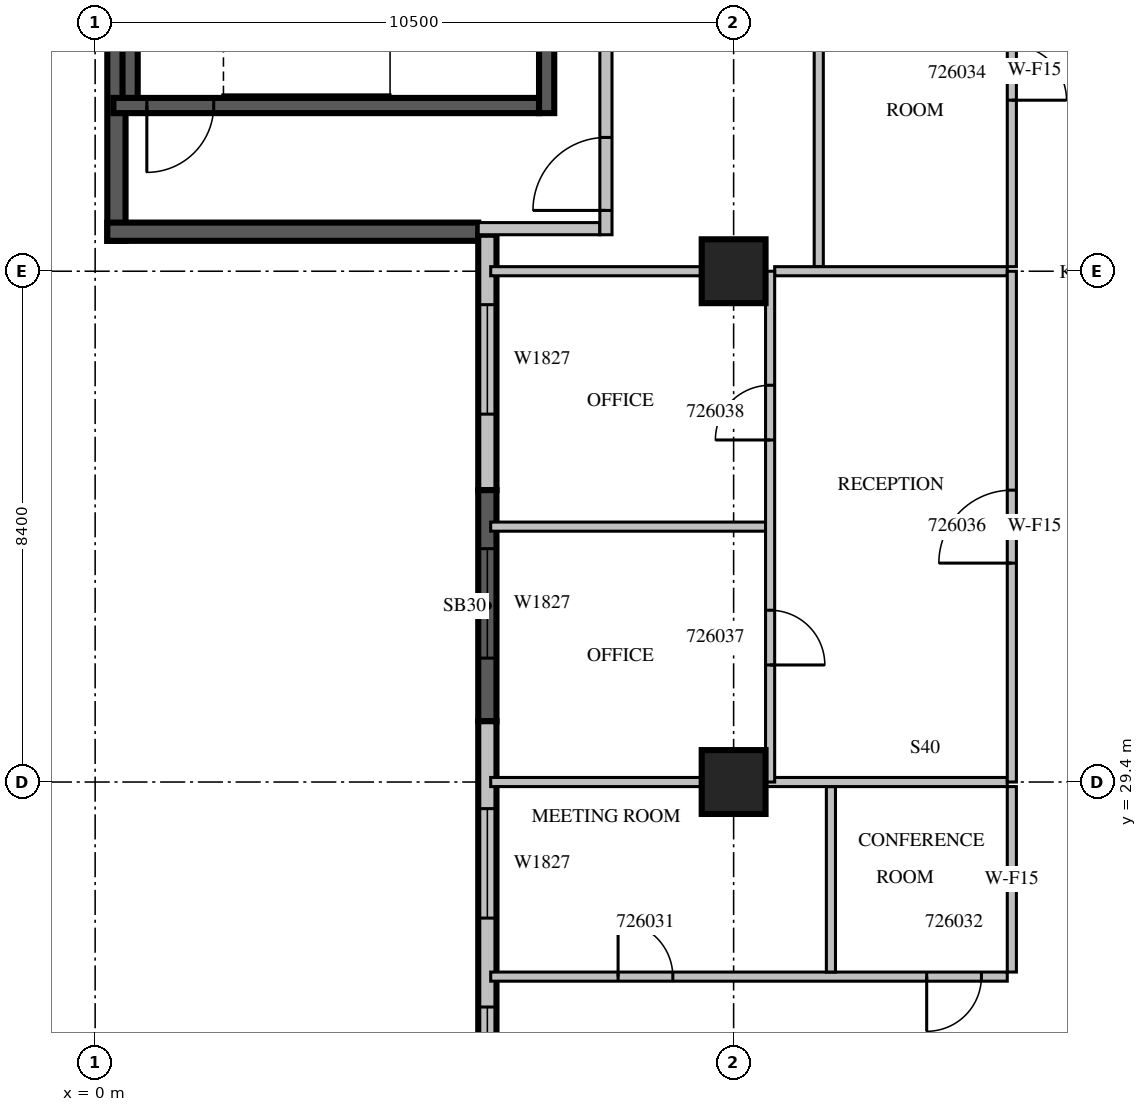
"""IFC4 building model, lengths in metres.
Left out: names, types, materials, properties, quantities, classifications, styles, units other than length and angle.
Written with IfcOpenShell. Run it as: python <this file> out.ifc"""

import sys

from ifc_helpers import new_model, si_unit, direction, frame, frame_2d, origin, origin_2d, place, context, subcontext, project, spatial, rectangle, extrude, source, transform, mapped, element, fill, save


model = new_model("IFC4")
c1 = context("Model", 3, precision=1e-05, world=origin(), true_north=direction((0.0, 1.0)))
c2 = subcontext(c1, "Body", "Model", "MODEL_VIEW")
j1 = project(units=[si_unit("LENGTHUNIT", "METRE"), si_unit("PLANEANGLEUNIT", "RADIAN")], contexts=[c1])
p1 = place(None, origin())
s1 = spatial("IfcSite", under=j1, at=p1, CompositionType="ELEMENT")
p2 = place(p1, origin())
s2 = spatial("IfcBuilding", under=s1, at=p2, CompositionType="ELEMENT")
p3 = place(p2, frame((0.0, 0.0, 120.3)))
s3 = spatial("IfcBuildingStorey", under=s2, at=p3, CompositionType="ELEMENT", Elevation=120.3)
m1 = source(origin(), c2, "Body", "SweptSolid", [
    extrude(rectangle(XDim=1.05, YDim=1.05, at=origin_2d()), origin(), (0.0, 0.0, 1.0), 4.2),
])
for number, where, z_axis, x_axis in (
    (1, (10.5, 29.4, 0.0), (0.0, 0.0, 1.0), (1.0, 0.0, 0.0)),
    (2, (10.5, 37.8, 0.0), (0.0, 0.0, 1.0), (1.0, 0.0, 0.0)),
):
    element("IfcColumn", number, at=place(p3, frame(where, z_axis=z_axis, x_axis=x_axis)), inside=s3, PredefinedType="COLUMN", context=c2, shape_type="MappedRepresentation", body=[
        mapped(m1, transform((0.0, 0.0, 0.0), scale=1.0)),
    ])
m2 = source(origin(), c2, "Body", "SweptSolid", [
    extrude(rectangle(XDim=5.65, YDim=0.3, at=frame_2d((2.825, 0.0))), origin(), (0.0, 0.0, 1.0), 3.8),
])
p4 = place(p3, frame((0.35, 43.95, 0.0), z_axis=(0.0, 0.0, 1.0), x_axis=(0.0, -1.0, 0.0)))
e3 = element("IfcWall", 3, at=p4, inside=s3, PredefinedType="SOLIDWALL", context=c2, shape_type="MappedRepresentation", body=[
    mapped(m2, transform((0.0, 0.0, 0.0), scale=1.0)),
])
m3 = source(origin(), c2, "Body", "SweptSolid", [
    extrude(rectangle(XDim=6.1, YDim=0.3, at=frame_2d((3.05, 0.0))), origin(), (0.0, 0.0, 1.0), 3.8),
])
p5 = place(p3, frame((0.2, 38.45, 0.0), z_axis=(0.0, 0.0, 1.0), x_axis=(1.0, 0.0, 0.0)))
e4 = element("IfcWall", 4, at=p5, inside=s3, PredefinedType="SOLIDWALL", context=c2, shape_type="MappedRepresentation", body=[
    mapped(m3, transform((0.0, 0.0, 0.0), scale=1.0)),
])
m4 = source(origin(), c2, "Body", "SweptSolid", [
    extrude(rectangle(XDim=4.2, YDim=0.3, at=frame_2d((2.1, 0.0))), origin(), (0.0, 0.0, 1.0), 3.8),
])
p6 = place(p3, frame((6.45, 38.4, 0.0), z_axis=(0.0, 0.0, 1.0), x_axis=(0.0, -1.0, 0.0)))
e5 = element("IfcWall", 5, at=p6, inside=s3, PredefinedType="STANDARD", context=c2, shape_type="MappedRepresentation", body=[
    mapped(m4, transform((0.0, 0.0, 0.0), scale=1.0)),
])
m5 = source(origin(), c2, "Body", "SweptSolid", [
    extrude(rectangle(XDim=1.8, YDim=2.7, at=frame_2d((0.9, 1.35))), frame((0.0, 0.16, 0.0), z_axis=(0.0, -1.0, 0.0), x_axis=(1.0, 0.0, 0.0)), (0.0, 0.0, 1.0), 0.32),
])
p7 = place(p6, frame((1.15, 0.0, 0.6)))
e6 = element("IfcOpeningElement", 6, at=p7, cuts=e5, PredefinedType="OPENING", context=c2, shape_type="MappedRepresentation", body=[
    mapped(m5, transform((0.0, 0.0, 0.0), scale=1.0)),
])
m6 = source(origin(), c2, "Body", "SweptSolid", [
    extrude(rectangle(XDim=3.8, YDim=0.3, at=frame_2d((1.9, 0.0))), origin(), (0.0, 0.0, 1.0), 3.8),
])
p8 = place(p3, frame((6.45, 34.2, 0.0), z_axis=(0.0, 0.0, 1.0), x_axis=(0.0, -1.0, 0.0)))
e7 = element("IfcWall", 7, at=p8, inside=s3, PredefinedType="SOLIDWALL", context=c2, shape_type="MappedRepresentation", body=[
    mapped(m6, transform((0.0, 0.0, 0.0), scale=1.0)),
])
p9 = place(p8, frame((0.963, 0.0, 0.6)))
e8 = element("IfcOpeningElement", 8, at=p9, cuts=e7, PredefinedType="OPENING", context=c2, shape_type="MappedRepresentation", body=[
    mapped(m5, transform((0.0, 0.0, 0.0), scale=1.0)),
])
m7 = source(origin(), c2, "Body", "SweptSolid", [
    extrude(rectangle(XDim=8.4, YDim=0.3, at=frame_2d((4.2, 0.0))), origin(), (0.0, 0.0, 1.0), 3.8),
])
p10 = place(p3, frame((6.45, 30.4, 0.0), z_axis=(0.0, 0.0, 1.0), x_axis=(0.0, -1.0, 0.0)))
e9 = element("IfcWall", 9, at=p10, inside=s3, PredefinedType="STANDARD", context=c2, shape_type="MappedRepresentation", body=[
    mapped(m7, transform((0.0, 0.0, 0.0), scale=1.0)),
])
p11 = place(p10, frame((1.438, 0.0, 0.6)))
e10 = element("IfcOpeningElement", 10, at=p11, cuts=e9, PredefinedType="OPENING", context=c2, shape_type="MappedRepresentation", body=[
    mapped(m5, transform((0.0, 0.0, 0.0), scale=1.0)),
])
m8 = source(origin(), c2, "Body", "SweptSolid", [
    extrude(rectangle(XDim=3.0, YDim=2.7, at=frame_2d((1.5, 1.35))), frame((0.0, 0.16, 0.0), z_axis=(0.0, -1.0, 0.0), x_axis=(1.0, 0.0, 0.0)), (0.0, 0.0, 1.0), 0.32),
])
p12 = place(p10, frame((4.7, 0.0, 0.6)))
e11 = element("IfcOpeningElement", 11, at=p12, cuts=e9, PredefinedType="OPENING", context=c2, shape_type="MappedRepresentation", body=[
    mapped(m8, transform((0.0, 0.0, 0.0), scale=1.0)),
])
m9 = source(origin(), c2, "Body", "SweptSolid", [
    extrude(rectangle(XDim=7.0, YDim=0.25, at=frame_2d((3.5, 0.0))), origin(), (0.0, 0.0, 1.0), 3.8),
])
p13 = place(p3, frame((0.3, 40.525, 0.0), z_axis=(0.0, 0.0, 1.0), x_axis=(1.0, 0.0, 0.0)))
e12 = element("IfcWall", 12, at=p13, inside=s3, PredefinedType="SOLIDWALL", context=c2, shape_type="MappedRepresentation", body=[
    mapped(m9, transform((0.0, 0.0, 0.0), scale=1.0)),
])
m10 = source(origin(), c2, "Body", "SweptSolid", [
    extrude(rectangle(XDim=1.1, YDim=2.1, at=frame_2d((0.55, 1.05))), frame((0.0, 0.135, 0.0), z_axis=(0.0, -1.0, 0.0), x_axis=(1.0, 0.0, 0.0)), (0.0, 0.0, 1.0), 0.27),
])
p14 = place(p13, frame((0.55, 0.0, 0.0)))
e13 = element("IfcOpeningElement", 13, at=p14, cuts=e12, PredefinedType="OPENING", context=c2, shape_type="MappedRepresentation", body=[
    mapped(m10, transform((0.0, 0.0, 0.0), scale=1.0)),
])
m11 = source(origin(), c2, "Body", "SweptSolid", [
    extrude(rectangle(XDim=3.45, YDim=0.25, at=frame_2d((1.725, 0.0))), origin(), (0.0, 0.0, 1.0), 3.8),
])
p15 = place(p3, frame((7.425, 40.4, 0.0), z_axis=(0.0, 0.0, 1.0), x_axis=(0.0, 1.0, 0.0)))
e14 = element("IfcWall", 14, at=p15, inside=s3, PredefinedType="SOLIDWALL", context=c2, shape_type="MappedRepresentation", body=[
    mapped(m11, transform((0.0, 0.0, 0.0), scale=1.0)),
])
m12 = source(origin(), c2, "Body", "SweptSolid", [
    extrude(rectangle(XDim=2.95, YDim=0.25, at=frame_2d((1.475, 0.0))), origin(), (0.0, 0.0, 1.0), 3.8),
])
p16 = place(p3, frame((0.575, 40.65, 0.0), z_axis=(0.0, 0.0, 1.0), x_axis=(0.0, 1.0, 0.0)))
e15 = element("IfcWall", 15, at=p16, inside=s3, PredefinedType="SOLIDWALL", context=c2, shape_type="MappedRepresentation", body=[
    mapped(m12, transform((0.0, 0.0, 0.0), scale=1.0)),
])
m13 = source(origin(), c2, "Body", "SweptSolid", [
    extrude(rectangle(XDim=2.0, YDim=0.2, at=frame_2d((1.0, 0.0))), origin(), (0.0, 0.0, 1.0), 3.8),
])
p17 = place(p3, frame((6.3, 38.5, 0.0), z_axis=(0.0, 0.0, 1.0), x_axis=(1.0, 0.0, 0.0)))
e16 = element("IfcWall", 16, at=p17, inside=s3, PredefinedType="PARTITIONING", context=c2, shape_type="MappedRepresentation", body=[
    mapped(m13, transform((0.0, 0.0, 0.0), scale=1.0)),
])
m14 = source(origin(), c2, "Body", "SweptSolid", [
    extrude(rectangle(XDim=5.45, YDim=0.2, at=frame_2d((2.725, 0.0))), origin(), (0.0, 0.0, 1.0), 3.8),
])
p18 = place(p3, frame((8.4, 38.4, 0.0), z_axis=(0.0, 0.0, 1.0), x_axis=(0.0, 1.0, 0.0)))
e17 = element("IfcWall", 17, at=p18, inside=s3, PredefinedType="PARTITIONING", context=c2, shape_type="MappedRepresentation", body=[
    mapped(m14, transform((0.0, 0.0, 0.0), scale=1.0)),
])
m15 = source(origin(), c2, "Body", "SweptSolid", [
    extrude(rectangle(XDim=1.2, YDim=2.1, at=frame_2d((0.6, 1.05))), frame((0.0, 0.11, 0.0), z_axis=(0.0, -1.0, 0.0), x_axis=(1.0, 0.0, 0.0)), (0.0, 0.0, 1.0), 0.22),
])
p19 = place(p18, frame((0.4, 0.0, 0.0)))
e18 = element("IfcOpeningElement", 18, at=p19, cuts=e17, PredefinedType="OPENING", context=c2, shape_type="MappedRepresentation", body=[
    mapped(m15, transform((0.0, 0.0, 0.0), scale=1.0)),
])
m16 = source(origin(), c2, "Body", "SweptSolid", [
    extrude(rectangle(XDim=0.9, YDim=2.1, at=frame_2d((0.45, 1.05))), frame((0.0, 0.11, 0.0), z_axis=(0.0, -1.0, 0.0), x_axis=(1.0, 0.0, 0.0)), (0.0, 0.0, 1.0), 0.22),
])
p20 = place(p18, frame((3.25, 0.0, 0.0)))
e19 = element("IfcOpeningElement", 19, at=p20, cuts=e17, PredefinedType="OPENING", context=c2, shape_type="MappedRepresentation", body=[
    mapped(m16, transform((0.0, 0.0, 0.0), scale=1.0)),
])
m17 = source(origin(), c2, "Body", "SweptSolid", [
    extrude(rectangle(XDim=8.495, YDim=0.15, at=frame_2d((4.247, 0.0))), origin(), (0.0, 0.0, 1.0), 3.8),
])
p21 = place(p3, frame((6.505, 26.2, 0.0), z_axis=(0.0, 0.0, 1.0), x_axis=(1.0, 0.0, 0.0)))
e20 = element("IfcWall", 20, at=p21, inside=s3, PredefinedType="PARTITIONING", context=c2, shape_type="MappedRepresentation", body=[
    mapped(m17, transform((0.0, 0.0, 0.0), scale=1.0)),
])
m18 = source(origin(), c2, "Body", "SweptSolid", [
    extrude(rectangle(XDim=0.9, YDim=2.1, at=frame_2d((0.45, 1.05))), frame((0.0, 0.085, 0.0), z_axis=(0.0, -1.0, 0.0), x_axis=(1.0, 0.0, 0.0)), (0.0, 0.0, 1.0), 0.17),
])
p22 = place(p21, frame((2.095, 0.0, 0.0)))
e21 = element("IfcOpeningElement", 21, at=p22, cuts=e20, PredefinedType="OPENING", context=c2, shape_type="MappedRepresentation", body=[
    mapped(m18, transform((0.0, 0.0, 0.0), scale=1.0)),
])
p23 = place(p21, frame((7.17, 0.0, 0.0)))
e22 = element("IfcOpeningElement", 22, at=p23, cuts=e20, PredefinedType="OPENING", context=c2, shape_type="MappedRepresentation", body=[
    mapped(m18, transform((0.0, 0.0, 0.0), scale=1.0)),
])
m19 = source(origin(), c2, "Body", "SweptSolid", [
    extrude(rectangle(XDim=3.05, YDim=0.15, at=frame_2d((1.525, 0.0))), origin(), (0.0, 0.0, 1.0), 3.8),
])
for number, where, z_axis, x_axis in (
    (23, (12.1, 26.275, 0.0), (0.0, 0.0, 1.0), (0.0, 1.0, 0.0)),
    (24, (15.075, 26.275, 0.0), (0.0, 0.0, 1.0), (0.0, 1.0, 0.0)),
):
    element("IfcWall", number, at=place(p3, frame(where, z_axis=z_axis, x_axis=x_axis)), inside=s3, PredefinedType="PARTITIONING", context=c2, shape_type="MappedRepresentation", body=[
        mapped(m19, transform((0.0, 0.0, 0.0), scale=1.0)),
    ])
m20 = source(origin(), c2, "Body", "SweptSolid", [
    extrude(rectangle(XDim=3.471, YDim=0.15, at=frame_2d((1.736, 0.0))), origin(), (0.0, 0.0, 1.0), 3.8),
])
p24 = place(p3, frame((9.976, 29.4, 0.0), z_axis=(0.0, 0.0, 1.0), x_axis=(-1.0, 0.0, 0.0)))
e25 = element("IfcWall", 25, at=p24, inside=s3, PredefinedType="PARTITIONING", context=c2, shape_type="MappedRepresentation", body=[
    mapped(m20, transform((0.0, 0.0, 0.0), scale=1.0)),
])
m21 = source(origin(), c2, "Body", "SweptSolid", [
    extrude(rectangle(XDim=3.976, YDim=0.15, at=frame_2d((1.988, 0.0))), origin(), (0.0, 0.0, 1.0), 3.8),
])
p25 = place(p3, frame((15.0, 29.4, 0.0), z_axis=(0.0, 0.0, 1.0), x_axis=(-1.0, 0.0, 0.0)))
e26 = element("IfcWall", 26, at=p25, inside=s3, PredefinedType="PARTITIONING", context=c2, shape_type="MappedRepresentation", body=[
    mapped(m21, transform((0.0, 0.0, 0.0), scale=1.0)),
])
m22 = source(origin(), c2, "Body", "SweptSolid", [
    extrude(rectangle(XDim=6.45, YDim=0.15, at=frame_2d((3.225, 0.0))), origin(), (0.0, 0.0, 1.0), 3.8),
])
p26 = place(p3, frame((11.9, 44.325, 0.0), z_axis=(0.0, 0.0, 1.0), x_axis=(0.0, -1.0, 0.0)))
e27 = element("IfcWall", 27, at=p26, inside=s3, PredefinedType="PARTITIONING", context=c2, shape_type="MappedRepresentation", body=[
    mapped(m22, transform((0.0, 0.0, 0.0), scale=1.0)),
])
p27 = place(p3, frame((15.075, 37.875, 0.0), z_axis=(0.0, 0.0, 1.0), x_axis=(0.0, 1.0, 0.0)))
e28 = element("IfcWall", 28, at=p27, inside=s3, PredefinedType="PARTITIONING", context=c2, shape_type="MappedRepresentation", body=[
    mapped(m22, transform((0.0, 0.0, 0.0), scale=1.0)),
])
p28 = place(p27, frame((2.737, 0.0, 0.0)))
e29 = element("IfcOpeningElement", 29, at=p28, cuts=e28, PredefinedType="OPENING", context=c2, shape_type="MappedRepresentation", body=[
    mapped(m18, transform((0.0, 0.0, 0.0), scale=1.0)),
])
m23 = source(origin(), c2, "Body", "SweptSolid", [
    extrude(rectangle(XDim=4.52, YDim=0.15, at=frame_2d((2.26, 0.0))), origin(), (0.0, 0.0, 1.0), 3.8),
])
p29 = place(p3, frame((11.025, 33.6, 0.0), z_axis=(0.0, 0.0, 1.0), x_axis=(-1.0, 0.0, 0.0)))
e30 = element("IfcWall", 30, at=p29, inside=s3, PredefinedType="PARTITIONING", context=c2, shape_type="MappedRepresentation", body=[
    mapped(m23, transform((0.0, 0.0, 0.0), scale=1.0)),
])
p30 = place(p3, frame((9.976, 37.8, 0.0), z_axis=(0.0, 0.0, 1.0), x_axis=(-1.0, 0.0, 0.0)))
e31 = element("IfcWall", 31, at=p30, inside=s3, PredefinedType="PARTITIONING", context=c2, shape_type="MappedRepresentation", body=[
    mapped(m20, transform((0.0, 0.0, 0.0), scale=1.0)),
])
m24 = source(origin(), c2, "Body", "SweptSolid", [
    extrude(rectangle(XDim=3.825, YDim=0.15, at=frame_2d((1.913, 0.0))), origin(), (0.0, 0.0, 1.0), 3.8),
])
p31 = place(p3, frame((15.0, 37.8, 0.0), z_axis=(0.0, 0.0, 1.0), x_axis=(-1.0, 0.0, 0.0)))
e32 = element("IfcWall", 32, at=p31, inside=s3, PredefinedType="PARTITIONING", context=c2, shape_type="MappedRepresentation", body=[
    mapped(m24, transform((0.0, 0.0, 0.0), scale=1.0)),
])
m25 = source(origin(), c2, "Body", "SweptSolid", [
    extrude(rectangle(XDim=8.4, YDim=0.15, at=frame_2d((4.2, 0.0))), origin(), (0.0, 0.0, 1.0), 3.8),
])
p32 = place(p3, frame((11.1, 29.4, 0.0), z_axis=(0.0, 0.0, 1.0), x_axis=(0.0, 1.0, 0.0)))
e33 = element("IfcWall", 33, at=p32, inside=s3, PredefinedType="PARTITIONING", context=c2, shape_type="MappedRepresentation", body=[
    mapped(m25, transform((0.0, 0.0, 0.0), scale=1.0)),
])
p33 = place(p32, frame((1.925, 0.0, 0.0)))
e34 = element("IfcOpeningElement", 34, at=p33, cuts=e33, PredefinedType="OPENING", context=c2, shape_type="MappedRepresentation", body=[
    mapped(m18, transform((0.0, 0.0, 0.0), scale=1.0)),
])
p34 = place(p32, frame((5.625, 0.0, 0.0)))
e35 = element("IfcOpeningElement", 35, at=p34, cuts=e33, PredefinedType="OPENING", context=c2, shape_type="MappedRepresentation", body=[
    mapped(m18, transform((0.0, 0.0, 0.0), scale=1.0)),
])
p35 = place(p3, frame((15.075, 29.4, 0.0), z_axis=(0.0, 0.0, 1.0), x_axis=(0.0, 1.0, 0.0)))
e36 = element("IfcWall", 36, at=p35, inside=s3, PredefinedType="PARTITIONING", context=c2, shape_type="MappedRepresentation", body=[
    mapped(m25, transform((0.0, 0.0, 0.0), scale=1.0)),
])
m26 = source(origin(), c2, "Body", "SweptSolid", [
    extrude(rectangle(XDim=1.2, YDim=2.1, at=frame_2d((0.6, 1.05))), frame((0.0, 0.085, 0.0), z_axis=(0.0, -1.0, 0.0), x_axis=(1.0, 0.0, 0.0)), (0.0, 0.0, 1.0), 0.17),
])
p36 = place(p35, frame((3.6, 0.0, 0.0)))
e37 = element("IfcOpeningElement", 37, at=p36, cuts=e36, PredefinedType="OPENING", context=c2, shape_type="MappedRepresentation", body=[
    mapped(m26, transform((0.0, 0.0, 0.0), scale=1.0)),
])
m27 = source(origin(), c2, "Body", "SweptSolid", [
    extrude(rectangle(XDim=1.8, YDim=2.7, at=frame_2d((0.9, 1.35))), frame((0.0, 0.03, 0.0), z_axis=(0.0, -1.0, 0.0), x_axis=(1.0, 0.0, 0.0)), (0.0, 0.0, 1.0), 0.06),
])
p37 = place(p7, origin())
e38 = element("IfcWindow", 38, at=p37, inside=s3, PartitioningType="SINGLE_PANEL", PredefinedType="WINDOW", context=c2, shape_type="MappedRepresentation", body=[
    mapped(m27, transform((0.0, 0.0, 0.0), scale=1.0)),
])
fill(e6, e38)
p38 = place(p9, origin())
e39 = element("IfcWindow", 39, at=p38, inside=s3, PartitioningType="SINGLE_PANEL", PredefinedType="WINDOW", context=c2, shape_type="MappedRepresentation", body=[
    mapped(m27, transform((0.0, 0.0, 0.0), scale=1.0)),
])
fill(e8, e39)
p39 = place(p11, origin())
e40 = element("IfcWindow", 40, at=p39, inside=s3, PartitioningType="SINGLE_PANEL", PredefinedType="WINDOW", context=c2, shape_type="MappedRepresentation", body=[
    mapped(m27, transform((0.0, 0.0, 0.0), scale=1.0)),
])
fill(e10, e40)
m28 = source(origin(), c2, "Body", "SweptSolid", [
    extrude(rectangle(XDim=3.0, YDim=2.7, at=frame_2d((1.5, 1.35))), frame((0.0, 0.03, 0.0), z_axis=(0.0, -1.0, 0.0), x_axis=(1.0, 0.0, 0.0)), (0.0, 0.0, 1.0), 0.06),
])
p40 = place(p12, origin())
e41 = element("IfcWindow", 41, at=p40, inside=s3, PartitioningType="SINGLE_PANEL", PredefinedType="WINDOW", context=c2, shape_type="MappedRepresentation", body=[
    mapped(m28, transform((0.0, 0.0, 0.0), scale=1.0)),
])
fill(e11, e41)
m29 = source(origin(), c2, "Body", "SweptSolid", [
    extrude(rectangle(XDim=1.1, YDim=2.1, at=frame_2d((0.55, 1.05))), frame((0.0, 0.025, 0.0), z_axis=(0.0, -1.0, 0.0), x_axis=(1.0, 0.0, 0.0)), (0.0, 0.0, 1.0), 0.05),
])
p41 = place(p14, origin())
e42 = element("IfcDoor", 42, at=p41, inside=s3, OperationType="SINGLE_SWING_RIGHT", PredefinedType="DOOR", context=c2, shape_type="MappedRepresentation", body=[
    mapped(m29, transform((0.0, 0.0, 0.0), scale=1.0)),
])
fill(e13, e42)
m30 = source(origin(), c2, "Body", "SweptSolid", [
    extrude(rectangle(XDim=1.2, YDim=2.1, at=frame_2d((0.6, 1.05))), frame((0.0, 0.025, 0.0), z_axis=(0.0, -1.0, 0.0), x_axis=(1.0, 0.0, 0.0)), (0.0, 0.0, 1.0), 0.05),
])
p42 = place(p19, origin())
e43 = element("IfcDoor", 43, at=p42, inside=s3, OperationType="SINGLE_SWING_LEFT", PredefinedType="DOOR", context=c2, shape_type="MappedRepresentation", body=[
    mapped(m30, transform((0.0, 0.0, 0.0), scale=1.0)),
])
fill(e18, e43)
m31 = source(origin(), c2, "Body", "SweptSolid", [
    extrude(rectangle(XDim=0.9, YDim=2.1, at=frame_2d((0.45, 1.05))), frame((0.0, 0.025, 0.0), z_axis=(0.0, -1.0, 0.0), x_axis=(1.0, 0.0, 0.0)), (0.0, 0.0, 1.0), 0.05),
])
p43 = place(p22, origin())
e44 = element("IfcDoor", 44, at=p43, inside=s3, OperationType="SINGLE_SWING_LEFT", PredefinedType="DOOR", context=c2, shape_type="MappedRepresentation", body=[
    mapped(m31, transform((0.0, 0.0, 0.0), scale=1.0)),
])
fill(e21, e44)
p44 = place(p23, origin())
e45 = element("IfcDoor", 45, at=p44, inside=s3, OperationType="SINGLE_SWING_RIGHT", PredefinedType="DOOR", context=c2, shape_type="MappedRepresentation", body=[
    mapped(m31, transform((0.0, 0.0, 0.0), scale=1.0)),
])
fill(e22, e45)
p45 = place(p28, origin())
e46 = element("IfcDoor", 46, at=p45, inside=s3, OperationType="SINGLE_SWING_RIGHT", PredefinedType="DOOR", context=c2, shape_type="MappedRepresentation", body=[
    mapped(m31, transform((0.0, 0.0, 0.0), scale=1.0)),
])
fill(e29, e46)
p46 = place(p36, origin())
e47 = element("IfcDoor", 47, at=p46, inside=s3, OperationType="SINGLE_SWING_LEFT", PredefinedType="DOOR", context=c2, shape_type="MappedRepresentation", body=[
    mapped(m30, transform((0.0, 0.0, 0.0), scale=1.0)),
])
fill(e37, e47)
p47 = place(p33, origin())
e48 = element("IfcDoor", 48, at=p47, inside=s3, OperationType="SINGLE_SWING_RIGHT", PredefinedType="DOOR", context=c2, shape_type="MappedRepresentation", body=[
    mapped(m31, transform((0.0, 0.0, 0.0), scale=1.0)),
])
fill(e34, e48)
p48 = place(p34, origin())
e49 = element("IfcDoor", 49, at=p48, inside=s3, OperationType="SINGLE_SWING_LEFT", PredefinedType="DOOR", context=c2, shape_type="MappedRepresentation", body=[
    mapped(m31, transform((0.0, 0.0, 0.0), scale=1.0)),
])
fill(e35, e49)
save(model, sys.argv[1])
